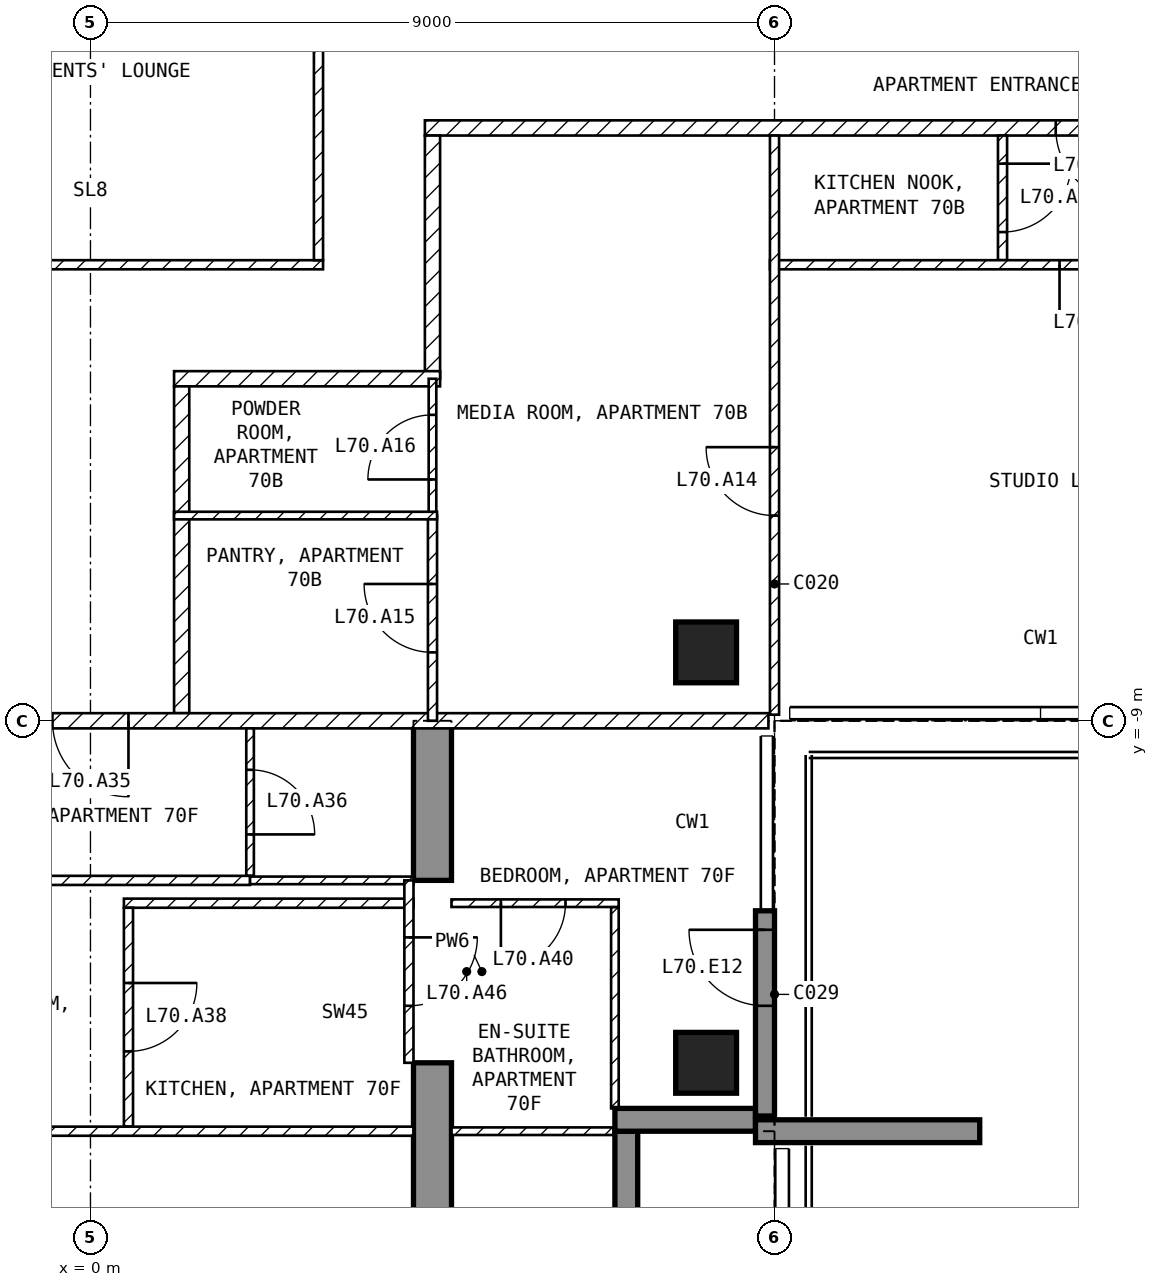
"""IFC4 building model, lengths in metres.
Left out: names, types, materials, properties, quantities, classifications, styles, units other than length and angle.
Written with IfcOpenShell. Run it as: python <this file> out.ifc"""

import sys

from ifc_helpers import new_model, si_unit, direction, frame, frame_2d, origin, origin_2d, place, context, subcontext, project, spatial, polyline, rectangle, outline, extrude, element, fill, save


model = new_model("IFC4")
c1 = context("Model", 3, precision=1e-05, world=origin(), true_north=direction((0.0, 1.0)))
c2 = subcontext(c1, "Body", "Model", "MODEL_VIEW")
j1 = project(units=[si_unit("LENGTHUNIT", "METRE"), si_unit("PLANEANGLEUNIT", "RADIAN")], contexts=[c1])
p1 = place(None, origin())
s1 = spatial("IfcSite", under=j1, at=p1, CompositionType="ELEMENT")
p2 = place(p1, origin())
s2 = spatial("IfcBuilding", under=s1, at=p2, CompositionType="ELEMENT")
p3 = place(p2, frame((0.0, 0.0, 274.5)))
s3 = spatial("IfcBuildingStorey", under=s2, at=p3, CompositionType="ELEMENT", Elevation=274.5)
for number, where, z_axis, x_axis in (
    (1, (8.1, -13.5, -0.25), (0.0, 0.0, 1.0), (1.0, 0.0, 0.0)),
    (2, (8.1, -8.1, -0.25), (0.0, 0.0, 1.0), (1.0, 0.0, 0.0)),
):
    element("IfcColumn", number, at=place(p3, frame(where, z_axis=z_axis, x_axis=x_axis)), inside=s3, PredefinedType="COLUMN", context=c2, shape_type="SweptSolid", body=[
        extrude(rectangle(XDim=0.8, YDim=0.8, at=origin_2d()), origin(), (0.0, 0.0, 1.0), 3.5),
    ])
p4 = place(p3, frame((4.25, -16.7, -0.25), z_axis=(1.0, 0.0, 0.0), x_axis=(0.0, 1.0, 0.0)))
e3 = element("IfcWall", 3, at=p4, inside=s3, PredefinedType="SHEAR", context=c2, shape_type="SweptSolid", body=[
    extrude(outline(polyline([(0.0, 0.0), (3.2, 0.0), (3.2, 2.65), (5.6, 2.65), (5.6, 0.0), (7.7, 0.0), (7.7, 3.5), (0.0, 3.5), (0.0, 0.0)])), origin(), (0.0, 0.0, 1.0), 0.5),
])
p5 = place(p3, frame((8.875, -14.2, 0.0), z_axis=(0.0, 0.0, 1.0), x_axis=(0.0, 1.0, 0.0)))
e4 = element("IfcWall", 4, at=p5, inside=s3, PredefinedType="SOLIDWALL", context=c2, shape_type="SweptSolid", body=[
    extrude(rectangle(XDim=2.7, YDim=0.25, at=frame_2d((1.35, 0.0))), origin(), (0.0, 0.0, 1.0), 3.25),
])
p6 = place(p5, frame((1.45, 0.0, 0.0)))
e5 = element("IfcOpeningElement", 5, at=p6, cuts=e4, PredefinedType="OPENING", context=c2, shape_type="SweptSolid", body=[
    extrude(rectangle(XDim=1.0, YDim=2.4, at=frame_2d((0.5, 1.2))), frame((0.0, 0.135, 0.0), z_axis=(0.0, -1.0, 0.0), x_axis=(1.0, 0.0, 0.0)), (0.0, 0.0, 1.0), 0.27),
])
p7 = place(p3, frame((7.05, -16.2, 0.0), z_axis=(0.0, 0.0, 1.0), x_axis=(0.0, 1.0, 0.0)))
e6 = element("IfcWall", 6, at=p7, inside=s3, PredefinedType="SOLIDWALL", context=c2, shape_type="SweptSolid", body=[
    extrude(rectangle(XDim=1.8, YDim=0.3, at=frame_2d((0.9, 0.0))), origin(), (0.0, 0.0, 1.0), 3.25),
])
p8 = place(p3, frame((6.9, -14.25, 0.0), z_axis=(0.0, 0.0, 1.0), x_axis=(1.0, 0.0, 0.0)))
e7 = element("IfcWall", 7, at=p8, inside=s3, PredefinedType="SOLIDWALL", context=c2, shape_type="SweptSolid", body=[
    extrude(rectangle(XDim=1.85, YDim=0.3, at=frame_2d((0.925, 0.0))), origin(), (0.0, 0.0, 1.0), 3.25),
])
p9 = place(p3, frame((8.75, -14.4, 0.0), z_axis=(0.0, 0.0, 1.0), x_axis=(1.0, 0.0, 0.0)))
e8 = element("IfcWall", 8, at=p9, inside=s3, PredefinedType="SOLIDWALL", context=c2, shape_type="SweptSolid", body=[
    extrude(rectangle(XDim=2.95, YDim=0.3, at=frame_2d((1.475, 0.0))), origin(), (0.0, 0.0, 1.0), 3.25),
])
p10 = place(p3, frame((-3.06, -3.0, 0.0), z_axis=(0.0, 0.0, 1.0), x_axis=(1.0, 0.0, 0.0)))
e9 = element("IfcWall", 9, at=p10, inside=s3, PredefinedType="PARTITIONING", context=c2, shape_type="SweptSolid", body=[
    extrude(rectangle(XDim=6.12, YDim=0.12, at=frame_2d((3.06, 0.0))), origin(), (0.0, 0.0, 1.0), 3.25),
])
p11 = place(p3, frame((3.0, -2.94, 0.0), z_axis=(0.0, 0.0, 1.0), x_axis=(0.0, 1.0, 0.0)))
e10 = element("IfcWall", 10, at=p11, inside=s3, PredefinedType="PARTITIONING", context=c2, shape_type="SweptSolid", body=[
    extrude(rectangle(XDim=5.88, YDim=0.12, at=frame_2d((2.94, 0.0))), origin(), (0.0, 0.0, 1.0), 3.25),
])
p12 = place(p3, frame((21.6, -1.2, 0.0), z_axis=(0.0, 0.0, 1.0), x_axis=(-1.0, 0.0, 0.0)))
e11 = element("IfcWall", 11, at=p12, inside=s3, PredefinedType="PARTITIONING", context=c2, shape_type="SweptSolid", body=[
    extrude(rectangle(XDim=17.2, YDim=0.2, at=frame_2d((8.6, 0.0))), origin(), (0.0, 0.0, 1.0), 3.25),
])
p13 = place(p12, frame((7.9, 0.0, 0.0)))
e12 = element("IfcOpeningElement", 12, at=p13, cuts=e11, PredefinedType="OPENING", context=c2, shape_type="SweptSolid", body=[
    extrude(rectangle(XDim=1.0, YDim=2.1, at=frame_2d((0.5, 1.05))), frame((0.0, 0.11, 0.0), z_axis=(0.0, -1.0, 0.0), x_axis=(1.0, 0.0, 0.0)), (0.0, 0.0, 1.0), 0.22),
])
p14 = place(p3, frame((4.5, -1.3, 0.0), z_axis=(0.0, 0.0, 1.0), x_axis=(0.0, -1.0, 0.0)))
e13 = element("IfcWall", 13, at=p14, inside=s3, PredefinedType="PARTITIONING", context=c2, shape_type="SweptSolid", body=[
    extrude(rectangle(XDim=3.2, YDim=0.2, at=frame_2d((1.6, 0.0))), origin(), (0.0, 0.0, 1.0), 3.25),
])
p15 = place(p3, frame((4.6, -4.5, 0.0), z_axis=(0.0, 0.0, 1.0), x_axis=(-1.0, 0.0, 0.0)))
e14 = element("IfcWall", 14, at=p15, inside=s3, PredefinedType="PARTITIONING", context=c2, shape_type="SweptSolid", body=[
    extrude(rectangle(XDim=3.5, YDim=0.2, at=frame_2d((1.75, 0.0))), origin(), (0.0, 0.0, 1.0), 3.25),
])
p16 = place(p3, frame((1.2, -4.6, 0.0), z_axis=(0.0, 0.0, 1.0), x_axis=(0.0, -1.0, 0.0)))
e15 = element("IfcWall", 15, at=p16, inside=s3, PredefinedType="PARTITIONING", context=c2, shape_type="SweptSolid", body=[
    extrude(rectangle(XDim=4.3, YDim=0.2, at=frame_2d((2.15, 0.0))), origin(), (0.0, 0.0, 1.0), 3.25),
])
p17 = place(p3, frame((8.92, -9.0, 0.0), z_axis=(0.0, 0.0, 1.0), x_axis=(-1.0, 0.0, 0.0)))
e16 = element("IfcWall", 16, at=p17, inside=s3, PredefinedType="PARTITIONING", context=c2, shape_type="SweptSolid", body=[
    extrude(rectangle(XDim=17.84, YDim=0.2, at=frame_2d((8.92, 0.0))), origin(), (0.0, 0.0, 1.0), 3.25),
])
p18 = place(p17, frame((8.42, 0.0, 0.0)))
e17 = element("IfcOpeningElement", 17, at=p18, cuts=e16, PredefinedType="OPENING", context=c2, shape_type="SweptSolid", body=[
    extrude(rectangle(XDim=1.0, YDim=2.1, at=frame_2d((0.5, 1.05))), frame((0.0, 0.11, 0.0), z_axis=(0.0, -1.0, 0.0), x_axis=(1.0, 0.0, 0.0)), (0.0, 0.0, 1.0), 0.22),
])
p19 = place(p3, frame((12.0, -1.3, 0.0), z_axis=(0.0, 0.0, 1.0), x_axis=(0.0, -1.0, 0.0)))
e18 = element("IfcWall", 18, at=p19, inside=s3, PredefinedType="PARTITIONING", context=c2, shape_type="SweptSolid", body=[
    extrude(rectangle(XDim=1.64, YDim=0.12, at=frame_2d((0.82, 0.0))), origin(), (0.0, 0.0, 1.0), 3.25),
])
p20 = place(p19, frame((0.37, 0.0, 0.0)))
e19 = element("IfcOpeningElement", 19, at=p20, cuts=e18, PredefinedType="OPENING", context=c2, shape_type="SweptSolid", body=[
    extrude(rectangle(XDim=0.9, YDim=2.1, at=frame_2d((0.45, 1.05))), frame((0.0, 0.07, 0.0), z_axis=(0.0, -1.0, 0.0), x_axis=(1.0, 0.0, 0.0)), (0.0, 0.0, 1.0), 0.14),
])
p21 = place(p3, frame((16.8, -3.0, 0.0), z_axis=(0.0, 0.0, 1.0), x_axis=(-1.0, 0.0, 0.0)))
e20 = element("IfcWall", 20, at=p21, inside=s3, PredefinedType="PARTITIONING", context=c2, shape_type="SweptSolid", body=[
    extrude(rectangle(XDim=7.86, YDim=0.12, at=frame_2d((3.93, 0.0))), origin(), (0.0, 0.0, 1.0), 3.25),
])
p22 = place(p21, frame((3.15, 0.0, 0.0)))
e21 = element("IfcOpeningElement", 21, at=p22, cuts=e20, PredefinedType="OPENING", context=c2, shape_type="SweptSolid", body=[
    extrude(rectangle(XDim=0.9, YDim=2.1, at=frame_2d((0.45, 1.05))), frame((0.0, 0.07, 0.0), z_axis=(0.0, -1.0, 0.0), x_axis=(1.0, 0.0, 0.0)), (0.0, 0.0, 1.0), 0.14),
])
p23 = place(p3, frame((9.0, -8.92, 0.0), z_axis=(0.0, 0.0, 1.0), x_axis=(0.0, 1.0, 0.0)))
e22 = element("IfcWall", 22, at=p23, inside=s3, PredefinedType="PARTITIONING", context=c2, shape_type="SweptSolid", body=[
    extrude(rectangle(XDim=7.62, YDim=0.12, at=frame_2d((3.81, 0.0))), origin(), (0.0, 0.0, 1.0), 3.25),
])
p24 = place(p23, frame((2.62, 0.0, 0.0)))
e23 = element("IfcOpeningElement", 23, at=p24, cuts=e22, PredefinedType="OPENING", context=c2, shape_type="SweptSolid", body=[
    extrude(rectangle(XDim=0.9, YDim=2.1, at=frame_2d((0.45, 1.05))), frame((0.0, 0.07, 0.0), z_axis=(0.0, -1.0, 0.0), x_axis=(1.0, 0.0, 0.0)), (0.0, 0.0, 1.0), 0.14),
])
p25 = place(p3, frame((4.5, -6.3, 0.0), z_axis=(0.0, 0.0, 1.0), x_axis=(0.0, 1.0, 0.0)))
e24 = element("IfcWall", 24, at=p25, inside=s3, PredefinedType="PARTITIONING", context=c2, shape_type="SweptSolid", body=[
    extrude(rectangle(XDim=1.8, YDim=0.1, at=frame_2d((0.9, 0.0))), origin(), (0.0, 0.0, 1.0), 3.25),
])
p26 = place(p25, frame((0.475, 0.0, 0.0)))
e25 = element("IfcOpeningElement", 25, at=p26, cuts=e24, PredefinedType="OPENING", context=c2, shape_type="SweptSolid", body=[
    extrude(rectangle(XDim=0.85, YDim=2.1, at=frame_2d((0.425, 1.05))), frame((0.0, 0.06, 0.0), z_axis=(0.0, -1.0, 0.0), x_axis=(1.0, 0.0, 0.0)), (0.0, 0.0, 1.0), 0.12),
])
p27 = place(p3, frame((4.5, -9.0, 0.0), z_axis=(0.0, 0.0, 1.0), x_axis=(0.0, 1.0, 0.0)))
e26 = element("IfcWall", 26, at=p27, inside=s3, PredefinedType="PARTITIONING", context=c2, shape_type="SweptSolid", body=[
    extrude(rectangle(XDim=2.7, YDim=0.12, at=frame_2d((1.35, 0.0))), origin(), (0.0, 0.0, 1.0), 3.25),
])
p28 = place(p27, frame((0.9, 0.0, 0.0)))
e27 = element("IfcOpeningElement", 27, at=p28, cuts=e26, PredefinedType="OPENING", context=c2, shape_type="SweptSolid", body=[
    extrude(rectangle(XDim=0.9, YDim=2.1, at=frame_2d((0.45, 1.05))), frame((0.0, 0.07, 0.0), z_axis=(0.0, -1.0, 0.0), x_axis=(1.0, 0.0, 0.0)), (0.0, 0.0, 1.0), 0.14),
])
p29 = place(p3, frame((4.56, -6.3, 0.0), z_axis=(0.0, 0.0, 1.0), x_axis=(-1.0, 0.0, 0.0)))
e28 = element("IfcWall", 28, at=p29, inside=s3, PredefinedType="PARTITIONING", context=c2, shape_type="SweptSolid", body=[
    extrude(rectangle(XDim=3.46, YDim=0.1, at=frame_2d((1.73, 0.0))), origin(), (0.0, 0.0, 1.0), 3.25),
])
p30 = place(p3, frame((2.1, -9.1, 0.0), z_axis=(0.0, 0.0, 1.0), x_axis=(0.0, -1.0, 0.0)))
e29 = element("IfcWall", 29, at=p30, inside=s3, PredefinedType="PARTITIONING", context=c2, shape_type="SweptSolid", body=[
    extrude(rectangle(XDim=1.94, YDim=0.1, at=frame_2d((0.97, 0.0))), origin(), (0.0, 0.0, 1.0), 3.25),
])
p31 = place(p30, frame((0.545, 0.0, 0.0)))
e30 = element("IfcOpeningElement", 30, at=p31, cuts=e29, PredefinedType="OPENING", context=c2, shape_type="SweptSolid", body=[
    extrude(rectangle(XDim=0.85, YDim=2.1, at=frame_2d((0.425, 1.05))), frame((0.0, 0.06, 0.0), z_axis=(0.0, -1.0, 0.0), x_axis=(1.0, 0.0, 0.0)), (0.0, 0.0, 1.0), 0.12),
])
p32 = place(p3, frame((2.1, -11.1, 0.0), z_axis=(0.0, 0.0, 1.0), x_axis=(-1.0, 0.0, 0.0)))
e31 = element("IfcWall", 31, at=p32, inside=s3, PredefinedType="PARTITIONING", context=c2, shape_type="SweptSolid", body=[
    extrude(rectangle(XDim=6.35, YDim=0.12, at=frame_2d((3.175, 0.0))), origin(), (0.0, 0.0, 1.0), 3.25),
])
p33 = place(p32, frame((2.725, 0.0, 0.0)))
e32 = element("IfcOpeningElement", 32, at=p33, cuts=e31, PredefinedType="OPENING", context=c2, shape_type="SweptSolid", body=[
    extrude(rectangle(XDim=0.9, YDim=2.1, at=frame_2d((0.45, 1.05))), frame((0.0, 0.07, 0.0), z_axis=(0.0, -1.0, 0.0), x_axis=(1.0, 0.0, 0.0)), (0.0, 0.0, 1.0), 0.14),
])
p34 = place(p3, frame((4.25, -11.1, 0.0), z_axis=(0.0, 0.0, 1.0), x_axis=(-1.0, 0.0, 0.0)))
e33 = element("IfcWall", 33, at=p34, inside=s3, PredefinedType="PARTITIONING", context=c2, shape_type="SweptSolid", body=[
    extrude(rectangle(XDim=2.15, YDim=0.1, at=frame_2d((1.075, 0.0))), origin(), (0.0, 0.0, 1.0), 3.25),
])
p35 = place(p3, frame((4.25, -11.4, 0.0), z_axis=(0.0, 0.0, 1.0), x_axis=(-1.0, 0.0, 0.0)))
e34 = element("IfcWall", 34, at=p35, inside=s3, PredefinedType="PARTITIONING", context=c2, shape_type="SweptSolid", body=[
    extrude(rectangle(XDim=3.81, YDim=0.12, at=frame_2d((1.905, 0.0))), origin(), (0.0, 0.0, 1.0), 3.25),
])
p36 = place(p3, frame((0.5, -11.46, 0.0), z_axis=(0.0, 0.0, 1.0), x_axis=(0.0, -1.0, 0.0)))
e35 = element("IfcWall", 35, at=p36, inside=s3, PredefinedType="PARTITIONING", context=c2, shape_type="SweptSolid", body=[
    extrude(rectangle(XDim=2.88, YDim=0.12, at=frame_2d((1.44, 0.0))), origin(), (0.0, 0.0, 1.0), 3.25),
])
p37 = place(p36, frame((0.99, 0.0, 0.0)))
e36 = element("IfcOpeningElement", 36, at=p37, cuts=e35, PredefinedType="OPENING", context=c2, shape_type="SweptSolid", body=[
    extrude(rectangle(XDim=0.9, YDim=2.1, at=frame_2d((0.45, 1.05))), frame((0.0, 0.07, 0.0), z_axis=(0.0, -1.0, 0.0), x_axis=(1.0, 0.0, 0.0)), (0.0, 0.0, 1.0), 0.14),
])
p38 = place(p3, frame((4.25, -14.4, 0.0), z_axis=(0.0, 0.0, 1.0), x_axis=(-1.0, 0.0, 0.0)))
e37 = element("IfcWall", 37, at=p38, inside=s3, PredefinedType="PARTITIONING", context=c2, shape_type="SweptSolid", body=[
    extrude(rectangle(XDim=8.5, YDim=0.12, at=frame_2d((4.25, 0.0))), origin(), (0.0, 0.0, 1.0), 3.25),
])
p39 = place(p38, frame((5.675, 0.0, 0.0)))
e38 = element("IfcOpeningElement", 38, at=p39, cuts=e37, PredefinedType="OPENING", context=c2, shape_type="SweptSolid", body=[
    extrude(rectangle(XDim=0.9, YDim=2.1, at=frame_2d((0.45, 1.05))), frame((0.0, 0.07, 0.0), z_axis=(0.0, -1.0, 0.0), x_axis=(1.0, 0.0, 0.0)), (0.0, 0.0, 1.0), 0.14),
])
p40 = place(p3, frame((6.9, -14.1, 0.0), z_axis=(0.0, 0.0, 1.0), x_axis=(0.0, 1.0, 0.0)))
e39 = element("IfcWall", 39, at=p40, inside=s3, PredefinedType="PARTITIONING", context=c2, shape_type="SweptSolid", body=[
    extrude(rectangle(XDim=2.65, YDim=0.1, at=frame_2d((1.325, 0.0))), origin(), (0.0, 0.0, 1.0), 3.25),
])
p41 = place(p3, frame((6.95, -11.4, 0.0), z_axis=(0.0, 0.0, 1.0), x_axis=(-1.0, 0.0, 0.0)))
e40 = element("IfcWall", 40, at=p41, inside=s3, PredefinedType="PARTITIONING", context=c2, shape_type="SweptSolid", body=[
    extrude(rectangle(XDim=2.2, YDim=0.1, at=frame_2d((1.1, 0.0))), origin(), (0.0, 0.0, 1.0), 3.25),
])
p42 = place(p41, frame((0.7, 0.0, 0.0)))
e41 = element("IfcOpeningElement", 41, at=p42, cuts=e40, PredefinedType="OPENING", context=c2, shape_type="SweptSolid", body=[
    extrude(rectangle(XDim=0.85, YDim=2.1, at=frame_2d((0.425, 1.05))), frame((0.0, 0.06, 0.0), z_axis=(0.0, -1.0, 0.0), x_axis=(1.0, 0.0, 0.0)), (0.0, 0.0, 1.0), 0.12),
])
p43 = place(p3, frame((7.12, -14.4, 0.0), z_axis=(0.0, 0.0, 1.0), x_axis=(-1.0, 0.0, 0.0)))
e42 = element("IfcWall", 42, at=p43, inside=s3, PredefinedType="PARTITIONING", context=c2, shape_type="SweptSolid", body=[
    extrude(rectangle(XDim=2.37, YDim=0.1, at=frame_2d((1.185, 0.0))), origin(), (0.0, 0.0, 1.0), 3.25),
])
p44 = place(p3, frame((4.19, -11.1, 0.0), z_axis=(0.0, 0.0, 1.0), x_axis=(0.0, -1.0, 0.0)))
e43 = element("IfcWall", 43, at=p44, inside=s3, PredefinedType="PARTITIONING", context=c2, shape_type="SweptSolid", body=[
    extrude(rectangle(XDim=2.4, YDim=0.12, at=frame_2d((1.2, 0.0))), origin(), (0.0, 0.0, 1.0), 2.4),
])
p45 = place(p44, frame((0.75, 0.0, 0.0)))
e44 = element("IfcOpeningElement", 44, at=p45, cuts=e43, PredefinedType="OPENING", context=c2, shape_type="SweptSolid", body=[
    extrude(rectangle(XDim=0.9, YDim=2.1, at=frame_2d((0.45, 1.05))), frame((0.0, 0.07, 0.0), z_axis=(0.0, -1.0, 0.0), x_axis=(1.0, 0.0, 0.0)), (0.0, 0.0, 1.0), 0.14),
])
p46 = place(p6, origin())
e45 = element("IfcDoor", 45, at=p46, inside=s3, OperationType="SINGLE_SWING_RIGHT", PredefinedType="DOOR", context=c2, shape_type="SweptSolid", body=[
    extrude(rectangle(XDim=1.0, YDim=2.4, at=frame_2d((0.5, 1.2))), frame((0.0, 0.025, 0.0), z_axis=(0.0, -1.0, 0.0), x_axis=(1.0, 0.0, 0.0)), (0.0, 0.0, 1.0), 0.05),
])
fill(e5, e45)
p47 = place(p20, origin())
e46 = element("IfcDoor", 46, at=p47, inside=s3, OperationType="SINGLE_SWING_LEFT", PredefinedType="DOOR", context=c2, shape_type="SweptSolid", body=[
    extrude(rectangle(XDim=0.9, YDim=2.1, at=frame_2d((0.45, 1.05))), frame((0.0, 0.025, 0.0), z_axis=(0.0, -1.0, 0.0), x_axis=(1.0, 0.0, 0.0)), (0.0, 0.0, 1.0), 0.05),
])
fill(e19, e46)
p48 = place(p24, origin())
e47 = element("IfcDoor", 47, at=p48, inside=s3, OperationType="SINGLE_SWING_RIGHT", PredefinedType="DOOR", context=c2, shape_type="SweptSolid", body=[
    extrude(rectangle(XDim=0.9, YDim=2.1, at=frame_2d((0.45, 1.05))), frame((0.0, 0.025, 0.0), z_axis=(0.0, -1.0, 0.0), x_axis=(1.0, 0.0, 0.0)), (0.0, 0.0, 1.0), 0.05),
])
fill(e23, e47)
p49 = place(p28, origin())
e48 = element("IfcDoor", 48, at=p49, inside=s3, OperationType="SINGLE_SWING_RIGHT", PredefinedType="DOOR", context=c2, shape_type="SweptSolid", body=[
    extrude(rectangle(XDim=0.9, YDim=2.1, at=frame_2d((0.45, 1.05))), frame((0.0, 0.025, 0.0), z_axis=(0.0, -1.0, 0.0), x_axis=(1.0, 0.0, 0.0)), (0.0, 0.0, 1.0), 0.05),
])
fill(e27, e48)
p50 = place(p26, origin())
e49 = element("IfcDoor", 49, at=p50, inside=s3, OperationType="SINGLE_SWING_LEFT", PredefinedType="DOOR", context=c2, shape_type="SweptSolid", body=[
    extrude(rectangle(XDim=0.85, YDim=2.1, at=frame_2d((0.425, 1.05))), frame((0.0, 0.025, 0.0), z_axis=(0.0, -1.0, 0.0), x_axis=(1.0, 0.0, 0.0)), (0.0, 0.0, 1.0), 0.05),
])
fill(e25, e49)
p51 = place(p22, origin())
e50 = element("IfcDoor", 50, at=p51, inside=s3, OperationType="SINGLE_SWING_RIGHT", PredefinedType="DOOR", context=c2, shape_type="SweptSolid", body=[
    extrude(rectangle(XDim=0.9, YDim=2.1, at=frame_2d((0.45, 1.05))), frame((0.0, 0.025, 0.0), z_axis=(0.0, -1.0, 0.0), x_axis=(1.0, 0.0, 0.0)), (0.0, 0.0, 1.0), 0.05),
])
fill(e21, e50)
p52 = place(p18, origin())
e51 = element("IfcDoor", 51, at=p52, inside=s3, OperationType="SINGLE_SWING_LEFT", PredefinedType="DOOR", context=c2, shape_type="SweptSolid", body=[
    extrude(rectangle(XDim=1.0, YDim=2.1, at=frame_2d((0.5, 1.05))), frame((0.0, 0.025, 0.0), z_axis=(0.0, -1.0, 0.0), x_axis=(1.0, 0.0, 0.0)), (0.0, 0.0, 1.0), 0.05),
])
fill(e17, e51)
p53 = place(p31, origin())
e52 = element("IfcDoor", 52, at=p53, inside=s3, OperationType="SINGLE_SWING_RIGHT", PredefinedType="DOOR", context=c2, shape_type="SweptSolid", body=[
    extrude(rectangle(XDim=0.85, YDim=2.1, at=frame_2d((0.425, 1.05))), frame((0.0, 0.025, 0.0), z_axis=(0.0, -1.0, 0.0), x_axis=(1.0, 0.0, 0.0)), (0.0, 0.0, 1.0), 0.05),
])
fill(e30, e52)
p54 = place(p37, origin())
e53 = element("IfcDoor", 53, at=p54, inside=s3, OperationType="SINGLE_SWING_LEFT", PredefinedType="DOOR", context=c2, shape_type="SweptSolid", body=[
    extrude(rectangle(XDim=0.9, YDim=2.1, at=frame_2d((0.45, 1.05))), frame((0.0, 0.025, 0.0), z_axis=(0.0, -1.0, 0.0), x_axis=(1.0, 0.0, 0.0)), (0.0, 0.0, 1.0), 0.05),
])
fill(e36, e53)
p55 = place(p42, origin())
e54 = element("IfcDoor", 54, at=p55, inside=s3, OperationType="SINGLE_SWING_RIGHT", PredefinedType="DOOR", context=c2, shape_type="SweptSolid", body=[
    extrude(rectangle(XDim=0.85, YDim=2.1, at=frame_2d((0.425, 1.05))), frame((0.0, 0.025, 0.0), z_axis=(0.0, -1.0, 0.0), x_axis=(1.0, 0.0, 0.0)), (0.0, 0.0, 1.0), 0.05),
])
fill(e41, e54)
p56 = place(p13, origin())
e55 = element("IfcDoor", 55, at=p56, inside=s3, OperationType="SINGLE_SWING_LEFT", PredefinedType="DOOR", context=c2, shape_type="SweptSolid", body=[
    extrude(rectangle(XDim=1.0, YDim=2.1, at=frame_2d((0.5, 1.05))), frame((0.0, 0.025, 0.0), z_axis=(0.0, -1.0, 0.0), x_axis=(1.0, 0.0, 0.0)), (0.0, 0.0, 1.0), 0.05),
])
fill(e12, e55)
p57 = place(p45, origin())
e56 = element("IfcDoor", 56, at=p57, inside=s3, OperationType="SINGLE_SWING_LEFT", PredefinedType="DOOR", context=c2, shape_type="SweptSolid", body=[
    extrude(rectangle(XDim=0.9, YDim=2.1, at=frame_2d((0.45, 1.05))), frame((0.0, 0.025, 0.0), z_axis=(0.0, -1.0, 0.0), x_axis=(1.0, 0.0, 0.0)), (0.0, 0.0, 1.0), 0.05),
])
fill(e44, e56)
save(model, sys.argv[1])
